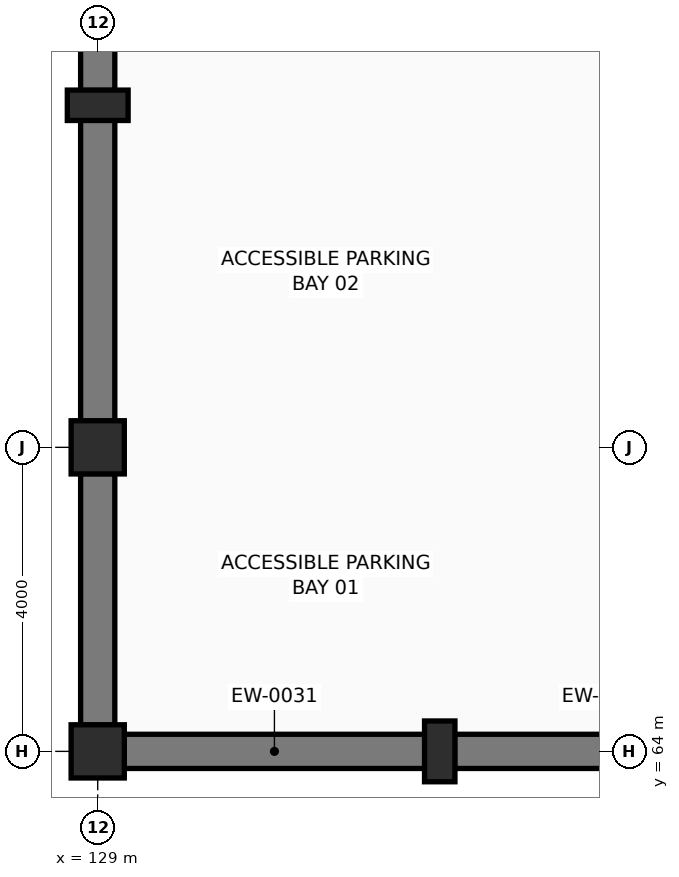
"""IFC4 building model, lengths in metres.
Left out: names, types, materials, properties, quantities, classifications, styles, units other than length and angle.
Written with IfcOpenShell. Run it as: python <this file> out.ifc"""

import sys

from ifc_helpers import new_model, si_unit, direction, frame, frame_2d, origin, origin_2d, place, context, subcontext, project, spatial, rectangle, extrude, element, save


model = new_model("IFC4")
c1 = context("Model", 3, precision=1e-05, world=origin(), true_north=direction((0.0, 1.0)))
c2 = subcontext(c1, "Body", "Model", "MODEL_VIEW")
j1 = project(units=[si_unit("LENGTHUNIT", "METRE"), si_unit("PLANEANGLEUNIT", "RADIAN")], contexts=[c1])
p1 = place(None, origin())
s1 = spatial("IfcSite", under=j1, at=p1, CompositionType="ELEMENT")
p2 = place(p1, origin())
s2 = spatial("IfcBuilding", under=s1, at=p2, CompositionType="ELEMENT")
p3 = place(p2, frame((0.0, 0.0, -4.5)))
s3 = spatial("IfcBuildingStorey", under=s2, at=p3, CompositionType="ELEMENT", Elevation=-4.5)
for number, where, z_axis, x_axis in (
    (1, (129.0, 64.0, 0.0), (0.0, 0.0, 1.0), (1.0, 0.0, 0.0)),
    (2, (129.0, 68.0, 0.0), (0.0, 0.0, 1.0), (1.0, 0.0, 0.0)),
):
    element("IfcColumn", number, at=place(p3, frame(where, z_axis=z_axis, x_axis=x_axis)), inside=s3, PredefinedType="COLUMN", context=c2, shape_type="SweptSolid", body=[
        extrude(rectangle(XDim=0.7, YDim=0.7, at=origin_2d()), origin(), (0.0, 0.0, 1.0), 4.5),
    ])
for number, where, z_axis, x_axis in (
    (3, (133.5, 64.0, 0.0), (0.0, 0.0, 1.0), (1.0, 0.0, 0.0)),
    (4, (129.0, 72.5, 0.0), (0.0, 0.0, 1.0), (0.0, 1.0, 0.0)),
):
    element("IfcColumn", number, at=place(p3, frame(where, z_axis=z_axis, x_axis=x_axis)), inside=s3, PredefinedType="PILASTER", context=c2, shape_type="SweptSolid", body=[
        extrude(rectangle(XDim=0.4, YDim=0.8, at=origin_2d()), origin(), (0.0, 0.0, 1.0), 4.5),
    ])
for number, where, z_axis, x_axis in (
    (5, (129.345, 64.0, 0.0), (0.0, 0.0, 1.0), (1.0, 0.0, 0.0)),
    (6, (133.695, 64.0, 0.0), (0.0, 0.0, 1.0), (1.0, 0.0, 0.0)),
    (7, (129.0, 76.655, 0.0), (0.0, 0.0, 1.0), (0.0, -1.0, 0.0)),
    (8, (129.0, 72.305, 0.0), (0.0, 0.0, 1.0), (0.0, -1.0, 0.0)),
):
    element("IfcWall", number, at=place(p3, frame(where, z_axis=z_axis, x_axis=x_axis)), inside=s3, PredefinedType="USERDEFINED", context=c2, shape_type="SweptSolid", body=[
        extrude(rectangle(XDim=3.96, YDim=0.45, at=frame_2d((1.98, 0.0))), origin(), (0.0, 0.0, 1.0), 3.775),
    ])
p4 = place(p3, frame((129.0, 67.655, 0.0), z_axis=(0.0, 0.0, 1.0), x_axis=(0.0, -1.0, 0.0)))
e9 = element("IfcWall", 9, at=p4, inside=s3, PredefinedType="USERDEFINED", context=c2, shape_type="SweptSolid", body=[
    extrude(rectangle(XDim=3.31, YDim=0.45, at=frame_2d((1.655, 0.0))), origin(), (0.0, 0.0, 1.0), 3.775),
])
save(model, sys.argv[1])
